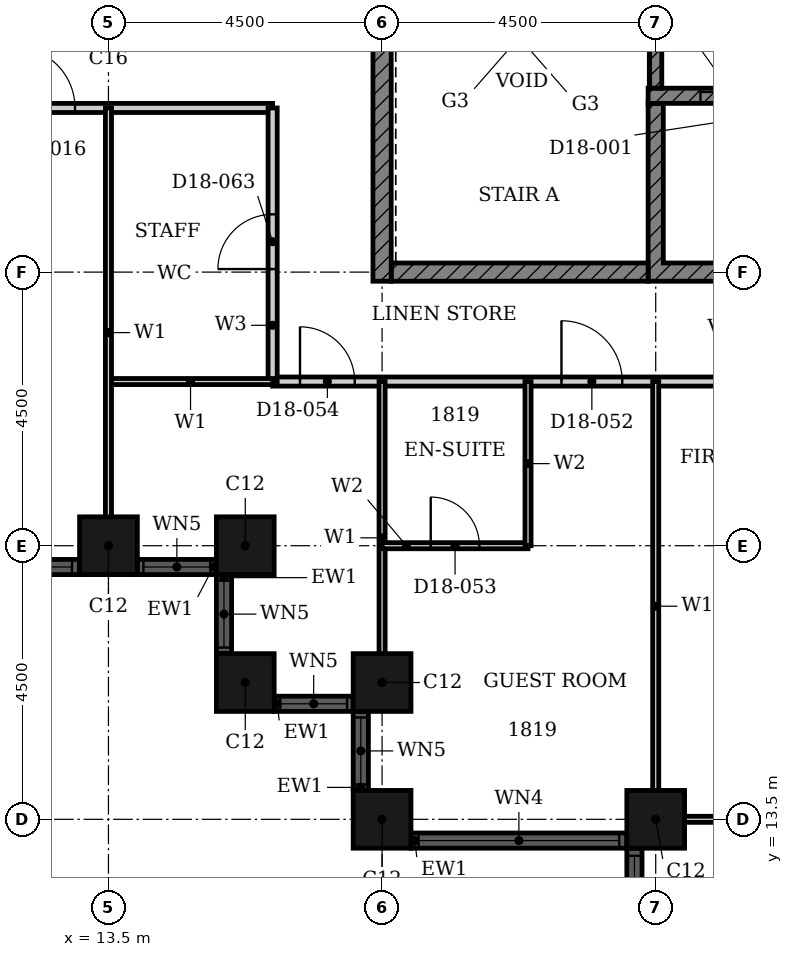
"""IFC4 building model, lengths in metres.
Left out: names, types, materials, properties, quantities, classifications, styles, units other than length and angle.
Written with IfcOpenShell. Run it as: python <this file> out.ifc"""

import sys

from ifc_helpers import new_model, si_unit, direction, frame, frame_2d, origin, origin_2d, place, context, subcontext, project, spatial, polyline, rectangle, hollow_rectangle, outline, extrude, element, fill, save


model = new_model("IFC4")
c1 = context("Model", 3, precision=1e-05, world=origin(), true_north=direction((0.0, 1.0)))
c2 = subcontext(c1, "Body", "Model", "MODEL_VIEW")
j1 = project(units=[si_unit("LENGTHUNIT", "METRE"), si_unit("PLANEANGLEUNIT", "RADIAN")], contexts=[c1])
p1 = place(None, origin())
s1 = spatial("IfcSite", under=j1, at=p1, CompositionType="ELEMENT")
p2 = place(p1, origin())
s2 = spatial("IfcBuilding", under=s1, at=p2, CompositionType="ELEMENT")
p3 = place(p2, frame((0.0, 0.0, 78.0)))
s3 = spatial("IfcBuildingStorey", under=s2, at=p3, CompositionType="ELEMENT", Elevation=78.0)
for number, where, z_axis, x_axis in (
    (1, (13.5, 18.0, 0.0), (0.0, 0.0, 1.0), (1.0, 0.0, 0.0)),
    (2, (15.75, 18.0, 0.0), (0.0, 0.0, 1.0), (1.0, 0.0, 0.0)),
    (3, (15.75, 15.75, 0.0), (0.0, 0.0, 1.0), (1.0, 0.0, 0.0)),
    (4, (18.0, 15.75, 0.0), (0.0, 0.0, 1.0), (1.0, 0.0, 0.0)),
    (5, (18.0, 13.5, 0.0), (0.0, 0.0, 1.0), (1.0, 0.0, 0.0)),
    (6, (22.5, 13.5, 0.0), (0.0, 0.0, 1.0), (1.0, 0.0, 0.0)),
):
    element("IfcColumn", number, at=place(p3, frame(where, z_axis=z_axis, x_axis=x_axis)), inside=s3, PredefinedType="COLUMN", context=c2, shape_type="SweptSolid", body=[
        extrude(hollow_rectangle(XDim=0.95, YDim=0.95, WallThickness=0.03, at=origin_2d()), origin(), (0.0, 0.0, 1.0), 3.6),
    ])
p4 = place(p3, frame((4.975, 17.65, 0.0), z_axis=(0.0, 0.0, 1.0), x_axis=(1.0, 0.0, 0.0)))
e7 = element("IfcWall", 7, at=p4, inside=s3, PredefinedType="SOLIDWALL", context=c2, shape_type="SweptSolid", body=[
    extrude(rectangle(XDim=8.05, YDim=0.25, at=frame_2d((4.025, 0.0))), origin(), (0.0, 0.0, 1.0), 3.6),
])
p5 = place(p4, frame((0.125, 0.0, 0.9)))
e8 = element("IfcOpeningElement", 8, at=p5, cuts=e7, PredefinedType="OPENING", context=c2, shape_type="SweptSolid", body=[
    extrude(rectangle(XDim=3.3, YDim=2.08, at=frame_2d((1.65, 1.04))), frame((0.0, 0.135, 0.0), z_axis=(0.0, -1.0, 0.0), x_axis=(1.0, 0.0, 0.0)), (0.0, 0.0, 1.0), 0.27),
])
p6 = place(p4, frame((4.625, 0.0, 0.9)))
e9 = element("IfcOpeningElement", 9, at=p6, cuts=e7, PredefinedType="OPENING", context=c2, shape_type="SweptSolid", body=[
    extrude(rectangle(XDim=3.3, YDim=2.08, at=frame_2d((1.65, 1.04))), frame((0.0, 0.135, 0.0), z_axis=(0.0, -1.0, 0.0), x_axis=(1.0, 0.0, 0.0)), (0.0, 0.0, 1.0), 0.27),
])
p7 = place(p3, frame((13.975, 17.65, 0.0), z_axis=(0.0, 0.0, 1.0), x_axis=(1.0, 0.0, 0.0)))
e10 = element("IfcWall", 10, at=p7, inside=s3, PredefinedType="SOLIDWALL", context=c2, shape_type="SweptSolid", body=[
    extrude(rectangle(XDim=1.3, YDim=0.25, at=frame_2d((0.65, 0.0))), origin(), (0.0, 0.0, 1.0), 3.6),
])
p8 = place(p7, frame((0.1, 0.0, 0.9)))
e11 = element("IfcOpeningElement", 11, at=p8, cuts=e10, PredefinedType="OPENING", context=c2, shape_type="SweptSolid", body=[
    extrude(rectangle(XDim=1.1, YDim=2.08, at=frame_2d((0.55, 1.04))), frame((0.0, 0.135, 0.0), z_axis=(0.0, -1.0, 0.0), x_axis=(1.0, 0.0, 0.0)), (0.0, 0.0, 1.0), 0.27),
])
p9 = place(p3, frame((15.4, 17.525, 0.0), z_axis=(0.0, 0.0, 1.0), x_axis=(0.0, -1.0, 0.0)))
e12 = element("IfcWall", 12, at=p9, inside=s3, PredefinedType="SOLIDWALL", context=c2, shape_type="SweptSolid", body=[
    extrude(rectangle(XDim=1.3, YDim=0.25, at=frame_2d((0.65, 0.0))), origin(), (0.0, 0.0, 1.0), 3.6),
])
p10 = place(p9, frame((0.1, 0.0, 0.9)))
e13 = element("IfcOpeningElement", 13, at=p10, cuts=e12, PredefinedType="OPENING", context=c2, shape_type="SweptSolid", body=[
    extrude(rectangle(XDim=1.1, YDim=2.08, at=frame_2d((0.55, 1.04))), frame((0.0, 0.135, 0.0), z_axis=(0.0, -1.0, 0.0), x_axis=(1.0, 0.0, 0.0)), (0.0, 0.0, 1.0), 0.27),
])
p11 = place(p3, frame((16.225, 15.4, 0.0), z_axis=(0.0, 0.0, 1.0), x_axis=(1.0, 0.0, 0.0)))
e14 = element("IfcWall", 14, at=p11, inside=s3, PredefinedType="SOLIDWALL", context=c2, shape_type="SweptSolid", body=[
    extrude(rectangle(XDim=1.3, YDim=0.25, at=frame_2d((0.65, 0.0))), origin(), (0.0, 0.0, 1.0), 3.6),
])
p12 = place(p11, frame((0.1, 0.0, 0.9)))
e15 = element("IfcOpeningElement", 15, at=p12, cuts=e14, PredefinedType="OPENING", context=c2, shape_type="SweptSolid", body=[
    extrude(rectangle(XDim=1.1, YDim=2.08, at=frame_2d((0.55, 1.04))), frame((0.0, 0.135, 0.0), z_axis=(0.0, -1.0, 0.0), x_axis=(1.0, 0.0, 0.0)), (0.0, 0.0, 1.0), 0.27),
])
p13 = place(p3, frame((17.65, 15.275, 0.0), z_axis=(0.0, 0.0, 1.0), x_axis=(0.0, -1.0, 0.0)))
e16 = element("IfcWall", 16, at=p13, inside=s3, PredefinedType="SOLIDWALL", context=c2, shape_type="SweptSolid", body=[
    extrude(rectangle(XDim=1.3, YDim=0.25, at=frame_2d((0.65, 0.0))), origin(), (0.0, 0.0, 1.0), 3.6),
])
p14 = place(p13, frame((0.1, 0.0, 0.9)))
e17 = element("IfcOpeningElement", 17, at=p14, cuts=e16, PredefinedType="OPENING", context=c2, shape_type="SweptSolid", body=[
    extrude(rectangle(XDim=1.1, YDim=2.08, at=frame_2d((0.55, 1.04))), frame((0.0, 0.135, 0.0), z_axis=(0.0, -1.0, 0.0), x_axis=(1.0, 0.0, 0.0)), (0.0, 0.0, 1.0), 0.27),
])
p15 = place(p3, frame((18.475, 13.15, 0.0), z_axis=(0.0, 0.0, 1.0), x_axis=(1.0, 0.0, 0.0)))
e18 = element("IfcWall", 18, at=p15, inside=s3, PredefinedType="SOLIDWALL", context=c2, shape_type="SweptSolid", body=[
    extrude(rectangle(XDim=3.55, YDim=0.25, at=frame_2d((1.775, 0.0))), origin(), (0.0, 0.0, 1.0), 3.6),
])
p16 = place(p15, frame((0.125, 0.0, 0.9)))
e19 = element("IfcOpeningElement", 19, at=p16, cuts=e18, PredefinedType="OPENING", context=c2, shape_type="SweptSolid", body=[
    extrude(rectangle(XDim=3.3, YDim=2.08, at=frame_2d((1.65, 1.04))), frame((0.0, 0.135, 0.0), z_axis=(0.0, -1.0, 0.0), x_axis=(1.0, 0.0, 0.0)), (0.0, 0.0, 1.0), 0.27),
])
p17 = place(p3, frame((22.15, 13.025, 0.0), z_axis=(0.0, 0.0, 1.0), x_axis=(0.0, -1.0, 0.0)))
e20 = element("IfcWall", 20, at=p17, inside=s3, PredefinedType="SOLIDWALL", context=c2, shape_type="SweptSolid", body=[
    extrude(rectangle(XDim=8.05, YDim=0.25, at=frame_2d((4.025, 0.0))), origin(), (0.0, 0.0, 1.0), 3.6),
])
p18 = place(p17, frame((0.125, 0.0, 0.9)))
e21 = element("IfcOpeningElement", 21, at=p18, cuts=e20, PredefinedType="OPENING", context=c2, shape_type="SweptSolid", body=[
    extrude(rectangle(XDim=3.3, YDim=2.08, at=frame_2d((1.65, 1.04))), frame((0.0, 0.135, 0.0), z_axis=(0.0, -1.0, 0.0), x_axis=(1.0, 0.0, 0.0)), (0.0, 0.0, 1.0), 0.27),
])
p19 = place(p17, frame((4.625, 0.0, 0.9)))
e22 = element("IfcOpeningElement", 22, at=p19, cuts=e20, PredefinedType="OPENING", context=c2, shape_type="SweptSolid", body=[
    extrude(rectangle(XDim=3.3, YDim=2.08, at=frame_2d((1.65, 1.04))), frame((0.0, 0.135, 0.0), z_axis=(0.0, -1.0, 0.0), x_axis=(1.0, 0.0, 0.0)), (0.0, 0.0, 1.0), 0.27),
])
p20 = place(p3, origin())
e23 = element("IfcWall", 23, at=p20, inside=s3, PredefinedType="SHEAR", context=c2, shape_type="SweptSolid", body=[
    extrude(outline(polyline([(22.375, 22.35), (38.053, 22.35), (38.053, 25.275), (37.803, 25.275), (37.803, 22.65), (35.482, 22.65), (35.482, 25.275), (35.232, 25.275), (35.232, 22.65), (32.911, 22.65), (32.911, 25.275), (32.661, 25.275), (32.661, 22.65), (30.339, 22.65), (30.339, 25.275), (30.089, 25.275), (30.089, 22.65), (27.768, 22.65), (27.768, 25.275), (27.518, 25.275), (27.518, 22.65), (25.197, 22.65), (25.197, 25.275), (24.947, 25.275), (24.947, 22.65), (22.625, 22.65), (22.625, 25.275), (22.375, 25.275), (22.375, 22.35)])), origin(), (0.0, 0.0, 1.0), 3.3),
])
p21 = place(p3, frame((18.15, 22.5, 0.0), z_axis=(0.0, 0.0, 1.0), x_axis=(1.0, 0.0, 0.0)))
e24 = element("IfcWall", 24, at=p21, inside=s3, PredefinedType="SHEAR", context=c2, shape_type="SweptSolid", body=[
    extrude(rectangle(XDim=4.225, YDim=0.3, at=frame_2d((2.113, 0.0))), origin(), (0.0, 0.0, 1.0), 3.3),
])
p22 = place(p3, frame((18.0, 22.35, 0.0), z_axis=(0.0, 0.0, 1.0), x_axis=(0.0, 1.0, 0.0)))
e25 = element("IfcWall", 25, at=p22, inside=s3, PredefinedType="SHEAR", context=c2, shape_type="SweptSolid", body=[
    extrude(rectangle(XDim=9.3, YDim=0.3, at=frame_2d((4.65, 0.0))), origin(), (0.0, 0.0, 1.0), 3.3),
])
p23 = place(p3, frame((22.375, 25.4, 0.0), z_axis=(0.0, 0.0, 1.0), x_axis=(1.0, 0.0, 0.0)))
e26 = element("IfcWall", 26, at=p23, inside=s3, PredefinedType="SHEAR", context=c2, shape_type="SweptSolid", body=[
    extrude(rectangle(XDim=15.678, YDim=0.25, at=frame_2d((7.839, 0.0))), origin(), (0.0, 0.0, 1.0), 3.3),
])
p24 = place(p23, frame((3.432, 0.0, 0.0)))
e27 = element("IfcOpeningElement", 27, at=p24, cuts=e26, PredefinedType="OPENING", context=c2, shape_type="SweptSolid", body=[
    extrude(rectangle(XDim=1.1, YDim=2.1, at=frame_2d((0.55, 1.05))), frame((0.0, 0.135, 0.0), z_axis=(0.0, -1.0, 0.0), x_axis=(1.0, 0.0, 0.0)), (0.0, 0.0, 1.0), 0.27),
])
p25 = place(p23, frame((11.146, 0.0, 0.0)))
e28 = element("IfcOpeningElement", 28, at=p25, cuts=e26, PredefinedType="OPENING", context=c2, shape_type="SweptSolid", body=[
    extrude(rectangle(XDim=1.1, YDim=2.1, at=frame_2d((0.55, 1.05))), frame((0.0, 0.135, 0.0), z_axis=(0.0, -1.0, 0.0), x_axis=(1.0, 0.0, 0.0)), (0.0, 0.0, 1.0), 0.27),
])
p26 = place(p23, frame((13.718, 0.0, 0.0)))
e29 = element("IfcOpeningElement", 29, at=p26, cuts=e26, PredefinedType="OPENING", context=c2, shape_type="SweptSolid", body=[
    extrude(rectangle(XDim=1.1, YDim=2.1, at=frame_2d((0.55, 1.05))), frame((0.0, 0.135, 0.0), z_axis=(0.0, -1.0, 0.0), x_axis=(1.0, 0.0, 0.0)), (0.0, 0.0, 1.0), 0.27),
])
p27 = place(p23, frame((0.861, 0.0, 0.0)))
e30 = element("IfcOpeningElement", 30, at=p27, cuts=e26, PredefinedType="OPENING", context=c2, shape_type="SweptSolid", body=[
    extrude(rectangle(XDim=1.1, YDim=2.1, at=frame_2d((0.55, 1.05))), frame((0.0, 0.135, 0.0), z_axis=(0.0, -1.0, 0.0), x_axis=(1.0, 0.0, 0.0)), (0.0, 0.0, 1.0), 0.27),
])
p28 = place(p3, frame((22.5, 31.35, 0.0), z_axis=(0.0, 0.0, 1.0), x_axis=(0.0, -1.0, 0.0)))
e31 = element("IfcWall", 31, at=p28, inside=s3, PredefinedType="SHEAR", context=c2, shape_type="SweptSolid", body=[
    extrude(rectangle(XDim=5.825, YDim=0.2, at=frame_2d((2.913, 0.0))), origin(), (0.0, 0.0, 1.0), 3.3),
])
p29 = place(p28, frame((0.25, 0.0, 0.0)))
e32 = element("IfcOpeningElement", 32, at=p29, cuts=e31, PredefinedType="OPENING", context=c2, shape_type="SweptSolid", body=[
    extrude(rectangle(XDim=1.8, YDim=2.1, at=frame_2d((0.9, 1.05))), frame((0.0, 0.11, 0.0), z_axis=(0.0, -1.0, 0.0), x_axis=(1.0, 0.0, 0.0)), (0.0, 0.0, 1.0), 0.22),
])
p30 = place(p3, frame((16.2, 20.7, 0.0), z_axis=(0.0, 0.0, 1.0), x_axis=(1.0, 0.0, 0.0)))
e33 = element("IfcWall", 33, at=p30, inside=s3, PredefinedType="PARTITIONING", context=c2, shape_type="SweptSolid", body=[
    extrude(rectangle(XDim=13.5, YDim=0.15, at=frame_2d((6.75, 0.0))), origin(), (0.0, 0.0, 1.0), 3.3),
])
p31 = place(p30, frame((4.75, 0.0, 0.0)))
e34 = element("IfcOpeningElement", 34, at=p31, cuts=e33, PredefinedType="OPENING", context=c2, shape_type="SweptSolid", body=[
    extrude(rectangle(XDim=1.0, YDim=2.1, at=frame_2d((0.5, 1.05))), frame((0.0, 0.085, 0.0), z_axis=(0.0, -1.0, 0.0), x_axis=(1.0, 0.0, 0.0)), (0.0, 0.0, 1.0), 0.17),
])
p32 = place(p30, frame((0.45, 0.0, 0.0)))
e35 = element("IfcOpeningElement", 35, at=p32, cuts=e33, PredefinedType="OPENING", context=c2, shape_type="SweptSolid", body=[
    extrude(rectangle(XDim=0.9, YDim=2.1, at=frame_2d((0.45, 1.05))), frame((0.0, 0.085, 0.0), z_axis=(0.0, -1.0, 0.0), x_axis=(1.0, 0.0, 0.0)), (0.0, 0.0, 1.0), 0.17),
])
p33 = place(p30, frame((9.45, 0.0, 0.0)))
e36 = element("IfcOpeningElement", 36, at=p33, cuts=e33, PredefinedType="OPENING", context=c2, shape_type="SweptSolid", body=[
    extrude(rectangle(XDim=0.9, YDim=2.1, at=frame_2d((0.45, 1.05))), frame((0.0, 0.085, 0.0), z_axis=(0.0, -1.0, 0.0), x_axis=(1.0, 0.0, 0.0)), (0.0, 0.0, 1.0), 0.17),
])
p34 = place(p3, frame((4.5, 25.2, 0.0), z_axis=(0.0, 0.0, 1.0), x_axis=(1.0, 0.0, 0.0)))
e37 = element("IfcWall", 37, at=p34, inside=s3, PredefinedType="PARTITIONING", context=c2, shape_type="SweptSolid", body=[
    extrude(rectangle(XDim=11.7, YDim=0.15, at=frame_2d((5.85, 0.0))), origin(), (0.0, 0.0, 1.0), 3.3),
])
p35 = place(p34, frame((7.45, 0.0, 0.0)))
e38 = element("IfcOpeningElement", 38, at=p35, cuts=e37, PredefinedType="OPENING", context=c2, shape_type="SweptSolid", body=[
    extrude(rectangle(XDim=1.0, YDim=2.1, at=frame_2d((0.5, 1.05))), frame((0.0, 0.085, 0.0), z_axis=(0.0, -1.0, 0.0), x_axis=(1.0, 0.0, 0.0)), (0.0, 0.0, 1.0), 0.17),
])
p36 = place(p34, frame((2.95, 0.0, 0.0)))
e39 = element("IfcOpeningElement", 39, at=p36, cuts=e37, PredefinedType="OPENING", context=c2, shape_type="SweptSolid", body=[
    extrude(rectangle(XDim=1.0, YDim=2.1, at=frame_2d((0.5, 1.05))), frame((0.0, 0.085, 0.0), z_axis=(0.0, -1.0, 0.0), x_axis=(1.0, 0.0, 0.0)), (0.0, 0.0, 1.0), 0.17),
])
p37 = place(p3, frame((16.2, 20.7, 0.0), z_axis=(0.0, 0.0, 1.0), x_axis=(0.0, 1.0, 0.0)))
e40 = element("IfcWall", 40, at=p37, inside=s3, PredefinedType="PARTITIONING", context=c2, shape_type="SweptSolid", body=[
    extrude(rectangle(XDim=4.5, YDim=0.15, at=frame_2d((2.25, 0.0))), origin(), (0.0, 0.0, 1.0), 3.3),
])
p38 = place(p37, frame((1.85, 0.0, 0.0)))
e41 = element("IfcOpeningElement", 41, at=p38, cuts=e40, PredefinedType="OPENING", context=c2, shape_type="SweptSolid", body=[
    extrude(rectangle(XDim=0.9, YDim=2.1, at=frame_2d((0.45, 1.05))), frame((0.0, 0.085, 0.0), z_axis=(0.0, -1.0, 0.0), x_axis=(1.0, 0.0, 0.0)), (0.0, 0.0, 1.0), 0.17),
])
p39 = place(p3, frame((22.31, 13.5, 0.0), z_axis=(0.0, 0.0, 1.0), x_axis=(1.0, 0.0, 0.0)))
e42 = element("IfcWall", 42, at=p39, inside=s3, PredefinedType="PARTITIONING", context=c2, shape_type="SweptSolid", body=[
    extrude(rectangle(XDim=7.39, YDim=0.1, at=frame_2d((3.695, 0.0))), origin(), (0.0, 0.0, 1.0), 2.38),
])
p40 = place(p3, frame((13.5, 20.7, 0.0), z_axis=(0.0, 0.0, 1.0), x_axis=(1.0, 0.0, 0.0)))
e43 = element("IfcWall", 43, at=p40, inside=s3, PredefinedType="PARTITIONING", context=c2, shape_type="SweptSolid", body=[
    extrude(rectangle(XDim=2.7, YDim=0.1, at=frame_2d((1.35, 0.0))), origin(), (0.0, 0.0, 1.0), 3.3),
])
p41 = place(p3, frame((13.5, 17.81, 0.0), z_axis=(0.0, 0.0, 1.0), x_axis=(0.0, 1.0, 0.0)))
e44 = element("IfcWall", 44, at=p41, inside=s3, PredefinedType="PARTITIONING", context=c2, shape_type="SweptSolid", body=[
    extrude(rectangle(XDim=7.39, YDim=0.1, at=frame_2d((3.695, 0.0))), origin(), (0.0, 0.0, 1.0), 2.38),
])
p42 = place(p3, frame((18.0, 15.56, 0.0), z_axis=(0.0, 0.0, 1.0), x_axis=(0.0, 1.0, 0.0)))
e45 = element("IfcWall", 45, at=p42, inside=s3, PredefinedType="PARTITIONING", context=c2, shape_type="SweptSolid", body=[
    extrude(rectangle(XDim=5.14, YDim=0.1, at=frame_2d((2.57, 0.0))), origin(), (0.0, 0.0, 1.0), 3.3),
])
p43 = place(p3, frame((22.5, 13.31, 0.0), z_axis=(0.0, 0.0, 1.0), x_axis=(0.0, 1.0, 0.0)))
e46 = element("IfcWall", 46, at=p43, inside=s3, PredefinedType="PARTITIONING", context=c2, shape_type="SweptSolid", body=[
    extrude(rectangle(XDim=7.39, YDim=0.1, at=frame_2d((3.695, 0.0))), origin(), (0.0, 0.0, 1.0), 3.3),
])
p44 = place(p3, frame((18.0, 18.0, 0.0), z_axis=(0.0, 0.0, 1.0), x_axis=(1.0, 0.0, 0.0)))
e47 = element("IfcWall", 47, at=p44, inside=s3, PredefinedType="PARTITIONING", context=c2, shape_type="SweptSolid", body=[
    extrude(rectangle(XDim=2.4, YDim=0.1, at=frame_2d((1.2, 0.0))), origin(), (0.0, 0.0, 1.0), 3.3),
])
p45 = place(p44, frame((0.8, 0.0, 0.0)))
e48 = element("IfcOpeningElement", 48, at=p45, cuts=e47, PredefinedType="OPENING", context=c2, shape_type="SweptSolid", body=[
    extrude(rectangle(XDim=0.8, YDim=2.1, at=frame_2d((0.4, 1.05))), frame((0.0, 0.06, 0.0), z_axis=(0.0, -1.0, 0.0), x_axis=(1.0, 0.0, 0.0)), (0.0, 0.0, 1.0), 0.12),
])
p46 = place(p3, frame((20.4, 18.0, 0.0), z_axis=(0.0, 0.0, 1.0), x_axis=(0.0, 1.0, 0.0)))
e49 = element("IfcWall", 49, at=p46, inside=s3, PredefinedType="PARTITIONING", context=c2, shape_type="SweptSolid", body=[
    extrude(rectangle(XDim=2.7, YDim=0.1, at=frame_2d((1.35, 0.0))), origin(), (0.0, 0.0, 1.0), 3.3),
])
p47 = place(p6, origin())
e50 = element("IfcWindow", 50, at=p47, inside=s3, PartitioningType="SINGLE_PANEL", PredefinedType="WINDOW", context=c2, shape_type="SweptSolid", body=[
    extrude(rectangle(XDim=3.3, YDim=2.08, at=frame_2d((1.65, 1.04))), frame((0.0, 0.03, 0.0), z_axis=(0.0, -1.0, 0.0), x_axis=(1.0, 0.0, 0.0)), (0.0, 0.0, 1.0), 0.06),
])
fill(e9, e50)
p48 = place(p8, origin())
e51 = element("IfcWindow", 51, at=p48, inside=s3, PartitioningType="SINGLE_PANEL", PredefinedType="WINDOW", context=c2, shape_type="SweptSolid", body=[
    extrude(rectangle(XDim=1.1, YDim=2.08, at=frame_2d((0.55, 1.04))), frame((0.0, 0.03, 0.0), z_axis=(0.0, -1.0, 0.0), x_axis=(1.0, 0.0, 0.0)), (0.0, 0.0, 1.0), 0.06),
])
fill(e11, e51)
p49 = place(p10, origin())
e52 = element("IfcWindow", 52, at=p49, inside=s3, PartitioningType="SINGLE_PANEL", PredefinedType="WINDOW", context=c2, shape_type="SweptSolid", body=[
    extrude(rectangle(XDim=1.1, YDim=2.08, at=frame_2d((0.55, 1.04))), frame((0.0, 0.03, 0.0), z_axis=(0.0, -1.0, 0.0), x_axis=(1.0, 0.0, 0.0)), (0.0, 0.0, 1.0), 0.06),
])
fill(e13, e52)
p50 = place(p12, origin())
e53 = element("IfcWindow", 53, at=p50, inside=s3, PartitioningType="SINGLE_PANEL", PredefinedType="WINDOW", context=c2, shape_type="SweptSolid", body=[
    extrude(rectangle(XDim=1.1, YDim=2.08, at=frame_2d((0.55, 1.04))), frame((0.0, 0.03, 0.0), z_axis=(0.0, -1.0, 0.0), x_axis=(1.0, 0.0, 0.0)), (0.0, 0.0, 1.0), 0.06),
])
fill(e15, e53)
p51 = place(p14, origin())
e54 = element("IfcWindow", 54, at=p51, inside=s3, PartitioningType="SINGLE_PANEL", PredefinedType="WINDOW", context=c2, shape_type="SweptSolid", body=[
    extrude(rectangle(XDim=1.1, YDim=2.08, at=frame_2d((0.55, 1.04))), frame((0.0, 0.03, 0.0), z_axis=(0.0, -1.0, 0.0), x_axis=(1.0, 0.0, 0.0)), (0.0, 0.0, 1.0), 0.06),
])
fill(e17, e54)
p52 = place(p16, origin())
e55 = element("IfcWindow", 55, at=p52, inside=s3, PartitioningType="SINGLE_PANEL", PredefinedType="WINDOW", context=c2, shape_type="SweptSolid", body=[
    extrude(rectangle(XDim=3.3, YDim=2.08, at=frame_2d((1.65, 1.04))), frame((0.0, 0.03, 0.0), z_axis=(0.0, -1.0, 0.0), x_axis=(1.0, 0.0, 0.0)), (0.0, 0.0, 1.0), 0.06),
])
fill(e19, e55)
p53 = place(p18, origin())
e56 = element("IfcWindow", 56, at=p53, inside=s3, PartitioningType="SINGLE_PANEL", PredefinedType="WINDOW", context=c2, shape_type="SweptSolid", body=[
    extrude(rectangle(XDim=3.3, YDim=2.08, at=frame_2d((1.65, 1.04))), frame((0.0, 0.03, 0.0), z_axis=(0.0, -1.0, 0.0), x_axis=(1.0, 0.0, 0.0)), (0.0, 0.0, 1.0), 0.06),
])
fill(e21, e56)
p54 = place(p27, origin())
e57 = element("IfcDoor", 57, at=p54, inside=s3, OperationType="DOUBLE_DOOR_SLIDING", PredefinedType="DOOR", context=c2, shape_type="SweptSolid", body=[
    extrude(rectangle(XDim=1.1, YDim=2.1, at=frame_2d((0.55, 1.05))), frame((0.0, 0.025, 0.0), z_axis=(0.0, -1.0, 0.0), x_axis=(1.0, 0.0, 0.0)), (0.0, 0.0, 1.0), 0.05),
])
fill(e30, e57)
p55 = place(p35, origin())
e58 = element("IfcDoor", 58, at=p55, inside=s3, OperationType="SINGLE_SWING_RIGHT", PredefinedType="DOOR", context=c2, shape_type="SweptSolid", body=[
    extrude(rectangle(XDim=1.0, YDim=2.1, at=frame_2d((0.5, 1.05))), frame((0.0, 0.025, 0.0), z_axis=(0.0, -1.0, 0.0), x_axis=(1.0, 0.0, 0.0)), (0.0, 0.0, 1.0), 0.05),
])
fill(e38, e58)
p56 = place(p31, origin())
e59 = element("IfcDoor", 59, at=p56, inside=s3, OperationType="SINGLE_SWING_RIGHT", PredefinedType="DOOR", context=c2, shape_type="SweptSolid", body=[
    extrude(rectangle(XDim=1.0, YDim=2.1, at=frame_2d((0.5, 1.05))), frame((0.0, 0.025, 0.0), z_axis=(0.0, -1.0, 0.0), x_axis=(1.0, 0.0, 0.0)), (0.0, 0.0, 1.0), 0.05),
])
fill(e34, e59)
p57 = place(p45, origin())
e60 = element("IfcDoor", 60, at=p57, inside=s3, OperationType="SINGLE_SWING_RIGHT", PredefinedType="DOOR", context=c2, shape_type="SweptSolid", body=[
    extrude(rectangle(XDim=0.8, YDim=2.1, at=frame_2d((0.4, 1.05))), frame((0.0, 0.025, 0.0), z_axis=(0.0, -1.0, 0.0), x_axis=(1.0, 0.0, 0.0)), (0.0, 0.0, 1.0), 0.05),
])
fill(e48, e60)
p58 = place(p32, origin())
e61 = element("IfcDoor", 61, at=p58, inside=s3, OperationType="SINGLE_SWING_LEFT", PredefinedType="DOOR", context=c2, shape_type="SweptSolid", body=[
    extrude(rectangle(XDim=0.9, YDim=2.1, at=frame_2d((0.45, 1.05))), frame((0.0, 0.025, 0.0), z_axis=(0.0, -1.0, 0.0), x_axis=(1.0, 0.0, 0.0)), (0.0, 0.0, 1.0), 0.05),
])
fill(e35, e61)
p59 = place(p38, origin())
e62 = element("IfcDoor", 62, at=p59, inside=s3, OperationType="SINGLE_SWING_LEFT", PredefinedType="DOOR", context=c2, shape_type="SweptSolid", body=[
    extrude(rectangle(XDim=0.9, YDim=2.1, at=frame_2d((0.45, 1.05))), frame((0.0, 0.025, 0.0), z_axis=(0.0, -1.0, 0.0), x_axis=(1.0, 0.0, 0.0)), (0.0, 0.0, 1.0), 0.05),
])
fill(e41, e62)
save(model, sys.argv[1])
